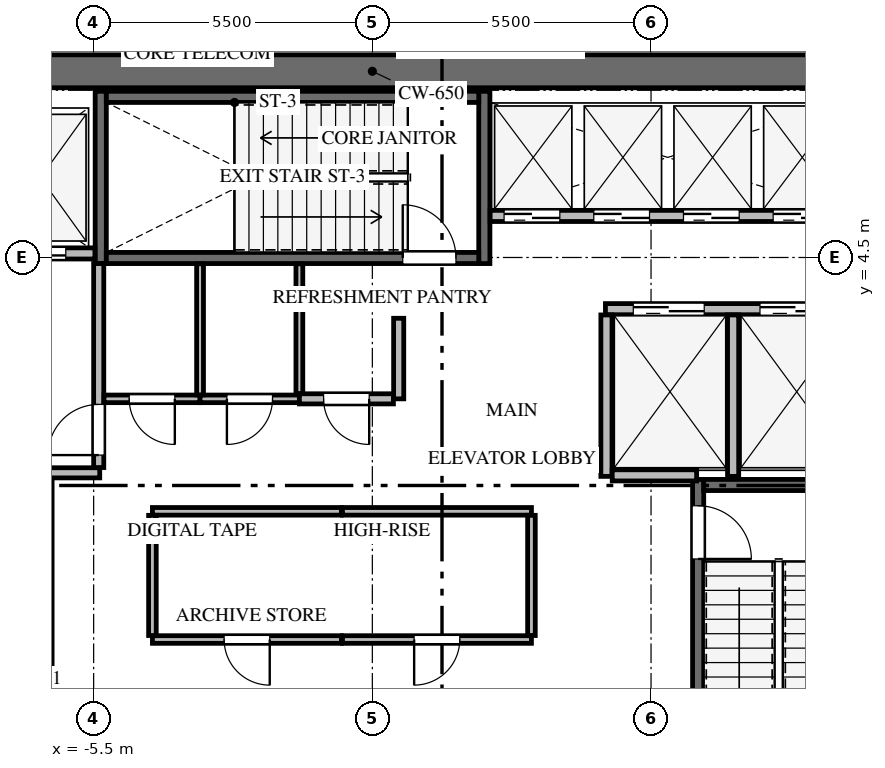
"""IFC4 building model, lengths in metres.
Left out: names, types, materials, properties, quantities, classifications, styles, units other than length and angle.
Written with IfcOpenShell. Run it as: python <this file> out.ifc"""

import sys

from ifc_helpers import new_model, si_unit, direction, frame, frame_2d, origin, place, context, subcontext, project, spatial, rectangle, extrude, source, transform, mapped, element, fill, save


model = new_model("IFC4")
c1 = context("Model", 3, precision=1e-05, world=origin(), true_north=direction((0.0, 1.0)))
c2 = subcontext(c1, "Body", "Model", "MODEL_VIEW")
j1 = project(units=[si_unit("LENGTHUNIT", "METRE"), si_unit("PLANEANGLEUNIT", "RADIAN")], contexts=[c1])
p1 = place(None, origin())
s1 = spatial("IfcSite", under=j1, at=p1, CompositionType="ELEMENT")
p2 = place(p1, origin())
s2 = spatial("IfcBuilding", under=s1, at=p2, CompositionType="ELEMENT")
p3 = place(p2, frame((0.0, 0.0, 162.6)))
s3 = spatial("IfcBuildingStorey", under=s2, at=p3, CompositionType="ELEMENT", Elevation=162.6)
p4 = place(p3, frame((-9.85, 8.175, 0.0), z_axis=(0.0, 0.0, 1.0), x_axis=(1.0, 0.0, 0.0)))
e1 = element("IfcWall", 1, at=p4, inside=s3, PredefinedType="SHEAR", context=c2, shape_type="SweptSolid", body=[
    extrude(rectangle(XDim=19.7, YDim=0.65, at=frame_2d((9.85, 0.0))), origin(), (0.0, 0.0, 1.0), 4.6),
])
p5 = place(p3, frame((-6.43, -7.77, -0.32), z_axis=(0.0, 0.0, 1.0), x_axis=(0.0, 1.0, 0.0)))
e2 = element("IfcWall", 2, at=p5, inside=s3, PredefinedType="SHEAR", context=c2, shape_type="SweptSolid", body=[
    extrude(rectangle(XDim=7.89, YDim=0.22, at=frame_2d((3.945, 0.0))), origin(), (0.0, 0.0, 1.0), 4.68),
])
p6 = place(p5, frame((6.32, 0.0, 0.0)))
e3 = element("IfcOpeningElement", 3, at=p6, cuts=e2, PredefinedType="OPENING", context=c2, shape_type="SweptSolid", body=[
    extrude(rectangle(XDim=1.05, YDim=2.15, at=frame_2d((0.525, 1.075))), frame((0.0, 0.12, 0.0), z_axis=(0.0, -1.0, 0.0), x_axis=(1.0, 0.0, 0.0)), (0.0, 0.0, 1.0), 0.24),
])
p7 = place(p3, frame((6.43, 0.12, -0.32), z_axis=(0.0, 0.0, 1.0), x_axis=(0.0, -1.0, 0.0)))
e4 = element("IfcWall", 4, at=p7, inside=s3, PredefinedType="SHEAR", context=c2, shape_type="SweptSolid", body=[
    extrude(rectangle(XDim=7.89, YDim=0.22, at=frame_2d((3.945, 0.0))), origin(), (0.0, 0.0, 1.0), 4.68),
])
p8 = place(p7, frame((0.52, 0.0, 0.0)))
e5 = element("IfcOpeningElement", 5, at=p8, cuts=e4, PredefinedType="OPENING", context=c2, shape_type="SweptSolid", body=[
    extrude(rectangle(XDim=1.05, YDim=2.15, at=frame_2d((0.525, 1.075))), frame((0.0, 0.12, 0.0), z_axis=(0.0, -1.0, 0.0), x_axis=(1.0, 0.0, 0.0)), (0.0, 0.0, 1.0), 0.24),
])
p9 = place(p3, frame((9.5, 0.01, -0.32), z_axis=(0.0, 0.0, 1.0), x_axis=(-1.0, 0.0, 0.0)))
e6 = element("IfcWall", 6, at=p9, inside=s3, PredefinedType="SHEAR", context=c2, shape_type="SweptSolid", body=[
    extrude(rectangle(XDim=2.96, YDim=0.22, at=frame_2d((1.48, 0.0))), origin(), (0.0, 0.0, 1.0), 4.68),
])
for number, where, z_axis, x_axis in (
    (7, (2.21, 4.38, -0.32), (0.0, 0.0, 1.0), (0.0, 1.0, 0.0)),
    (8, (-5.36, 7.78, -0.32), (0.0, 0.0, 1.0), (0.0, -1.0, 0.0)),
):
    element("IfcWall", number, at=place(p3, frame(where, z_axis=z_axis, x_axis=x_axis)), inside=s3, PredefinedType="SHEAR", context=c2, shape_type="SweptSolid", body=[
        extrude(rectangle(XDim=3.4, YDim=0.22, at=frame_2d((1.7, 0.0))), origin(), (0.0, 0.0, 1.0), 4.68),
    ])
p10 = place(p3, frame((-5.25, 4.49, -0.32), z_axis=(0.0, 0.0, 1.0), x_axis=(1.0, 0.0, 0.0)))
e9 = element("IfcWall", 9, at=p10, inside=s3, PredefinedType="SHEAR", context=c2, shape_type="SweptSolid", body=[
    extrude(rectangle(XDim=7.35, YDim=0.22, at=frame_2d((3.675, 0.0))), origin(), (0.0, 0.0, 1.0), 4.68),
])
p11 = place(p10, frame((5.85, 0.0, 0.0)))
e10 = element("IfcOpeningElement", 10, at=p11, cuts=e9, PredefinedType="OPENING", context=c2, shape_type="SweptSolid", body=[
    extrude(rectangle(XDim=1.05, YDim=2.15, at=frame_2d((0.525, 1.075))), frame((0.0, 0.12, 0.0), z_axis=(0.0, -1.0, 0.0), x_axis=(1.0, 0.0, 0.0)), (0.0, 0.0, 1.0), 0.24),
])
p12 = place(p3, frame((2.1, 7.67, -0.32), z_axis=(0.0, 0.0, 1.0), x_axis=(-1.0, 0.0, 0.0)))
e11 = element("IfcWall", 11, at=p12, inside=s3, PredefinedType="SHEAR", context=c2, shape_type="SweptSolid", body=[
    extrude(rectangle(XDim=7.35, YDim=0.22, at=frame_2d((3.675, 0.0))), origin(), (0.0, 0.0, 1.0), 4.68),
])
p13 = place(p3, frame((-9.65, 4.58, 0.0), z_axis=(0.0, 0.0, 1.0), x_axis=(1.0, 0.0, 0.0)))
e12 = element("IfcWall", 12, at=p13, inside=s3, PredefinedType="SOLIDWALL", context=c2, shape_type="SweptSolid", body=[
    extrude(rectangle(XDim=4.175, YDim=0.22, at=frame_2d((2.087, 0.0))), origin(), (0.0, 0.0, 1.0), 4.345),
])
p14 = place(p13, frame((0.4, 0.0, 0.0)))
e13 = element("IfcOpeningElement", 13, at=p14, cuts=e12, PredefinedType="OPENING", context=c2, shape_type="SweptSolid", body=[
    extrude(rectangle(XDim=1.2, YDim=2.15, at=frame_2d((0.6, 1.075))), frame((0.0, 0.12, 0.0), z_axis=(0.0, -1.0, 0.0), x_axis=(1.0, 0.0, 0.0)), (0.0, 0.0, 1.0), 0.24),
])
p15 = place(p13, frame((2.4, 0.0, 0.0)))
e14 = element("IfcOpeningElement", 14, at=p15, cuts=e12, PredefinedType="OPENING", context=c2, shape_type="SweptSolid", body=[
    extrude(rectangle(XDim=1.2, YDim=2.15, at=frame_2d((0.6, 1.075))), frame((0.0, 0.12, 0.0), z_axis=(0.0, -1.0, 0.0), x_axis=(1.0, 0.0, 0.0)), (0.0, 0.0, 1.0), 0.24),
])
p16 = place(p3, frame((-9.65, 0.25, 0.0), z_axis=(0.0, 0.0, 1.0), x_axis=(1.0, 0.0, 0.0)))
e15 = element("IfcWall", 15, at=p16, inside=s3, PredefinedType="SOLIDWALL", context=c2, shape_type="SweptSolid", body=[
    extrude(rectangle(XDim=4.27, YDim=0.2, at=frame_2d((2.135, 0.0))), origin(), (0.0, 0.0, 1.0), 4.345),
])
p17 = place(p3, frame((-5.4, 0.354, 0.0), z_axis=(0.0, 0.0, 1.0), x_axis=(0.0, 1.0, 0.0)))
e16 = element("IfcWall", 16, at=p17, inside=s3, PredefinedType="SOLIDWALL", context=c2, shape_type="SweptSolid", body=[
    extrude(rectangle(XDim=4.026, YDim=0.2, at=frame_2d((2.013, 0.0))), origin(), (0.0, 0.0, 1.0), 4.345),
])
p18 = place(p17, frame((0.246, 0.0, 0.0)))
e17 = element("IfcOpeningElement", 17, at=p18, cuts=e16, PredefinedType="OPENING", context=c2, shape_type="SweptSolid", body=[
    extrude(rectangle(XDim=1.0, YDim=2.15, at=frame_2d((0.5, 1.075))), frame((0.0, 0.11, 0.0), z_axis=(0.0, -1.0, 0.0), x_axis=(1.0, 0.0, 0.0)), (0.0, 0.0, 1.0), 0.22),
])
p19 = place(p3, frame((4.6, 3.48, 0.0), z_axis=(0.0, 0.0, 1.0), x_axis=(1.0, 0.0, 0.0)))
e18 = element("IfcWall", 18, at=p19, inside=s3, PredefinedType="SOLIDWALL", context=c2, shape_type="SweptSolid", body=[
    extrude(rectangle(XDim=5.05, YDim=0.22, at=frame_2d((2.525, 0.0))), origin(), (0.0, 0.0, 1.0), 4.345),
])
p20 = place(p19, frame((0.55, 0.0, 0.0)))
e19 = element("IfcOpeningElement", 19, at=p20, cuts=e18, PredefinedType="OPENING", context=c2, shape_type="SweptSolid", body=[
    extrude(rectangle(XDim=1.4, YDim=2.15, at=frame_2d((0.7, 1.075))), frame((0.0, 0.12, 0.0), z_axis=(0.0, -1.0, 0.0), x_axis=(1.0, 0.0, 0.0)), (0.0, 0.0, 1.0), 0.24),
])
p21 = place(p19, frame((3.05, 0.0, 0.0)))
e20 = element("IfcOpeningElement", 20, at=p21, cuts=e18, PredefinedType="OPENING", context=c2, shape_type="SweptSolid", body=[
    extrude(rectangle(XDim=1.4, YDim=2.15, at=frame_2d((0.7, 1.075))), frame((0.0, 0.12, 0.0), z_axis=(0.0, -1.0, 0.0), x_axis=(1.0, 0.0, 0.0)), (0.0, 0.0, 1.0), 0.24),
])
for number, where, z_axis, x_axis in (
    (21, (4.62, 0.18, 0.0), (0.0, 0.0, 1.0), (0.0, 1.0, 0.0)),
    (22, (7.12, 0.18, 0.0), (0.0, 0.0, 1.0), (0.0, 1.0, 0.0)),
):
    element("IfcWall", number, at=place(p3, frame(where, z_axis=z_axis, x_axis=x_axis)), inside=s3, PredefinedType="SOLIDWALL", context=c2, shape_type="SweptSolid", body=[
        extrude(rectangle(XDim=3.186, YDim=0.22, at=frame_2d((1.593, 0.0))), origin(), (0.0, 0.0, 1.0), 4.345),
    ])
p22 = place(p3, frame((4.734, 0.2, 0.0), z_axis=(0.0, 0.0, 1.0), x_axis=(1.0, 0.0, 0.0)))
e23 = element("IfcWall", 23, at=p22, inside=s3, PredefinedType="SOLIDWALL", context=c2, shape_type="SweptSolid", body=[
    extrude(rectangle(XDim=1.666, YDim=0.22, at=frame_2d((0.833, 0.0))), origin(), (0.0, 0.0, 1.0), 4.345),
])
p23 = place(p3, frame((2.325, 5.32, 0.0), z_axis=(0.0, 0.0, 1.0), x_axis=(1.0, 0.0, 0.0)))
e24 = element("IfcWall", 24, at=p23, inside=s3, PredefinedType="SOLIDWALL", context=c2, shape_type="SweptSolid", body=[
    extrude(rectangle(XDim=7.325, YDim=0.22, at=frame_2d((3.663, 0.0))), origin(), (0.0, 0.0, 1.0), 4.345),
])
p24 = place(p23, frame((0.275, 0.0, 0.0)))
e25 = element("IfcOpeningElement", 25, at=p24, cuts=e24, PredefinedType="OPENING", context=c2, shape_type="SweptSolid", body=[
    extrude(rectangle(XDim=1.1, YDim=2.15, at=frame_2d((0.55, 1.075))), frame((0.0, 0.12, 0.0), z_axis=(0.0, -1.0, 0.0), x_axis=(1.0, 0.0, 0.0)), (0.0, 0.0, 1.0), 0.24),
])
p25 = place(p23, frame((2.045, 0.0, 0.0)))
e26 = element("IfcOpeningElement", 26, at=p25, cuts=e24, PredefinedType="OPENING", context=c2, shape_type="SweptSolid", body=[
    extrude(rectangle(XDim=1.1, YDim=2.15, at=frame_2d((0.55, 1.075))), frame((0.0, 0.12, 0.0), z_axis=(0.0, -1.0, 0.0), x_axis=(1.0, 0.0, 0.0)), (0.0, 0.0, 1.0), 0.24),
])
p26 = place(p23, frame((3.815, 0.0, 0.0)))
e27 = element("IfcOpeningElement", 27, at=p26, cuts=e24, PredefinedType="OPENING", context=c2, shape_type="SweptSolid", body=[
    extrude(rectangle(XDim=1.1, YDim=2.15, at=frame_2d((0.55, 1.075))), frame((0.0, 0.12, 0.0), z_axis=(0.0, -1.0, 0.0), x_axis=(1.0, 0.0, 0.0)), (0.0, 0.0, 1.0), 0.24),
])
p27 = place(p23, frame((5.585, 0.0, 0.0)))
e28 = element("IfcOpeningElement", 28, at=p27, cuts=e24, PredefinedType="OPENING", context=c2, shape_type="SweptSolid", body=[
    extrude(rectangle(XDim=1.1, YDim=2.15, at=frame_2d((0.55, 1.075))), frame((0.0, 0.12, 0.0), z_axis=(0.0, -1.0, 0.0), x_axis=(1.0, 0.0, 0.0)), (0.0, 0.0, 1.0), 0.24),
])
p28 = place(p3, frame((-0.61, -3.04, 0.0), z_axis=(0.0, 0.0, 1.0), x_axis=(-1.0, 0.0, 0.0)))
e29 = element("IfcWall", 29, at=p28, inside=s3, PredefinedType="PARTITIONING", context=c2, shape_type="SweptSolid", body=[
    extrude(rectangle(XDim=3.73, YDim=0.15, at=frame_2d((1.865, 0.0))), origin(), (0.0, 0.0, 1.0), 4.345),
])
p29 = place(p28, frame((1.415, 0.0, 0.0)))
e30 = element("IfcOpeningElement", 30, at=p29, cuts=e29, PredefinedType="OPENING", context=c2, shape_type="SweptSolid", body=[
    extrude(rectangle(XDim=0.9, YDim=2.05, at=frame_2d((0.45, 1.025))), frame((0.0, 0.085, 0.0), z_axis=(0.0, -1.0, 0.0), x_axis=(1.0, 0.0, 0.0)), (0.0, 0.0, 1.0), 0.17),
])
p30 = place(p3, frame((-4.34, -0.51, 0.0), z_axis=(0.0, 0.0, 1.0), x_axis=(1.0, 0.0, 0.0)))
e31 = element("IfcWall", 31, at=p30, inside=s3, PredefinedType="PARTITIONING", context=c2, shape_type="SweptSolid", body=[
    extrude(rectangle(XDim=3.73, YDim=0.15, at=frame_2d((1.865, 0.0))), origin(), (0.0, 0.0, 1.0), 4.345),
])
p31 = place(p3, frame((-4.34, -2.961, 0.0), z_axis=(0.0, 0.0, 1.0), x_axis=(0.0, 1.0, 0.0)))
e32 = element("IfcWall", 32, at=p31, inside=s3, PredefinedType="PARTITIONING", context=c2, shape_type="SweptSolid", body=[
    extrude(rectangle(XDim=2.372, YDim=0.15, at=frame_2d((1.186, 0.0))), origin(), (0.0, 0.0, 1.0), 4.345),
])
p32 = place(p3, frame((3.14, -3.04, 0.0), z_axis=(0.0, 0.0, 1.0), x_axis=(-1.0, 0.0, 0.0)))
e33 = element("IfcWall", 33, at=p32, inside=s3, PredefinedType="PARTITIONING", context=c2, shape_type="SweptSolid", body=[
    extrude(rectangle(XDim=3.73, YDim=0.15, at=frame_2d((1.865, 0.0))), origin(), (0.0, 0.0, 1.0), 4.345),
])
p33 = place(p32, frame((1.415, 0.0, 0.0)))
e34 = element("IfcOpeningElement", 34, at=p33, cuts=e33, PredefinedType="OPENING", context=c2, shape_type="SweptSolid", body=[
    extrude(rectangle(XDim=0.9, YDim=2.05, at=frame_2d((0.45, 1.025))), frame((0.0, 0.085, 0.0), z_axis=(0.0, -1.0, 0.0), x_axis=(1.0, 0.0, 0.0)), (0.0, 0.0, 1.0), 0.17),
])
p34 = place(p3, frame((-0.59, -0.51, 0.0), z_axis=(0.0, 0.0, 1.0), x_axis=(1.0, 0.0, 0.0)))
e35 = element("IfcWall", 35, at=p34, inside=s3, PredefinedType="PARTITIONING", context=c2, shape_type="SweptSolid", body=[
    extrude(rectangle(XDim=3.73, YDim=0.15, at=frame_2d((1.865, 0.0))), origin(), (0.0, 0.0, 1.0), 4.345),
])
p35 = place(p3, frame((3.14, -0.589, 0.0), z_axis=(0.0, 0.0, 1.0), x_axis=(0.0, -1.0, 0.0)))
e36 = element("IfcWall", 36, at=p35, inside=s3, PredefinedType="PARTITIONING", context=c2, shape_type="SweptSolid", body=[
    extrude(rectangle(XDim=2.372, YDim=0.15, at=frame_2d((1.186, 0.0))), origin(), (0.0, 0.0, 1.0), 4.345),
])
p36 = place(p3, frame((-3.4, 1.71, 0.0), z_axis=(0.0, 0.0, 1.0), x_axis=(-1.0, 0.0, 0.0)))
e37 = element("IfcWall", 37, at=p36, inside=s3, PredefinedType="PARTITIONING", context=c2, shape_type="SweptSolid", body=[
    extrude(rectangle(XDim=1.896, YDim=0.15, at=frame_2d((0.948, 0.0))), origin(), (0.0, 0.0, 1.0), 4.345),
])
p37 = place(p36, frame((0.498, 0.0, 0.0)))
e38 = element("IfcOpeningElement", 38, at=p37, cuts=e37, PredefinedType="OPENING", context=c2, shape_type="SweptSolid", body=[
    extrude(rectangle(XDim=0.9, YDim=2.05, at=frame_2d((0.45, 1.025))), frame((0.0, 0.085, 0.0), z_axis=(0.0, -1.0, 0.0), x_axis=(1.0, 0.0, 0.0)), (0.0, 0.0, 1.0), 0.17),
])
p38 = place(p3, frame((-1.44, 1.71, 0.0), z_axis=(0.0, 0.0, 1.0), x_axis=(-1.0, 0.0, 0.0)))
e39 = element("IfcWall", 39, at=p38, inside=s3, PredefinedType="PARTITIONING", context=c2, shape_type="SweptSolid", body=[
    extrude(rectangle(XDim=1.96, YDim=0.15, at=frame_2d((0.98, 0.0))), origin(), (0.0, 0.0, 1.0), 4.345),
])
p39 = place(p38, frame((0.53, 0.0, 0.0)))
e40 = element("IfcOpeningElement", 40, at=p39, cuts=e39, PredefinedType="OPENING", context=c2, shape_type="SweptSolid", body=[
    extrude(rectangle(XDim=0.9, YDim=2.05, at=frame_2d((0.45, 1.025))), frame((0.0, 0.085, 0.0), z_axis=(0.0, -1.0, 0.0), x_axis=(1.0, 0.0, 0.0)), (0.0, 0.0, 1.0), 0.17),
])
p40 = place(p3, frame((0.52, 3.3, 0.0), z_axis=(0.0, 0.0, 1.0), x_axis=(0.0, -1.0, 0.0)))
e41 = element("IfcWall", 41, at=p40, inside=s3, PredefinedType="SOLIDWALL", context=c2, shape_type="SweptSolid", body=[
    extrude(rectangle(XDim=1.59, YDim=0.2, at=frame_2d((0.795, 0.0))), origin(), (0.0, 0.0, 1.0), 4.345),
])
p41 = place(p3, frame((0.416, 1.71, 0.0), z_axis=(0.0, 0.0, 1.0), x_axis=(-1.0, 0.0, 0.0)))
e42 = element("IfcWall", 42, at=p41, inside=s3, PredefinedType="SOLIDWALL", context=c2, shape_type="SweptSolid", body=[
    extrude(rectangle(XDim=1.856, YDim=0.2, at=frame_2d((0.928, 0.0))), origin(), (0.0, 0.0, 1.0), 4.345),
])
p42 = place(p41, frame((0.478, 0.0, 0.0)))
e43 = element("IfcOpeningElement", 43, at=p42, cuts=e42, PredefinedType="OPENING", context=c2, shape_type="SweptSolid", body=[
    extrude(rectangle(XDim=0.9, YDim=2.05, at=frame_2d((0.45, 1.025))), frame((0.0, 0.11, 0.0), z_axis=(0.0, -1.0, 0.0), x_axis=(1.0, 0.0, 0.0)), (0.0, 0.0, 1.0), 0.22),
])
p43 = place(p3, frame((-3.4, 4.375, 0.0), z_axis=(0.0, 0.0, 1.0), x_axis=(0.0, -1.0, 0.0)))
e44 = element("IfcWall", 44, at=p43, inside=s3, PredefinedType="PARTITIONING", context=c2, shape_type="SweptSolid", body=[
    extrude(rectangle(XDim=2.586, YDim=0.135, at=frame_2d((1.293, 0.0))), origin(), (0.0, 0.0, 1.0), 4.345),
])
p44 = place(p3, frame((-1.44, 4.375, 0.0), z_axis=(0.0, 0.0, 1.0), x_axis=(0.0, -1.0, 0.0)))
e45 = element("IfcWall", 45, at=p44, inside=s3, PredefinedType="PARTITIONING", context=c2, shape_type="SweptSolid", body=[
    extrude(rectangle(XDim=2.561, YDim=0.135, at=frame_2d((1.281, 0.0))), origin(), (0.0, 0.0, 1.0), 4.345),
])
m1 = source(origin(), c2, "Body", "SweptSolid", [
    extrude(rectangle(XDim=1.05, YDim=2.15, at=frame_2d((0.525, 1.075))), frame((0.0, 0.025, 0.0), z_axis=(0.0, -1.0, 0.0), x_axis=(1.0, 0.0, 0.0)), (0.0, 0.0, 1.0), 0.05),
])
p45 = place(p8, origin())
e46 = element("IfcDoor", 46, at=p45, inside=s3, OperationType="SINGLE_SWING_RIGHT", PredefinedType="DOOR", context=c2, shape_type="MappedRepresentation", body=[
    mapped(m1, transform((0.0, 0.0, 0.0), x_axis=(1.0, 0.0, 0.0), y_axis=(0.0, 1.0, 0.0), z_axis=(0.0, 0.0, 1.0), scale=1.0)),
])
fill(e5, e46)
m2 = source(origin(), c2, "Body", "SweptSolid", [
    extrude(rectangle(XDim=1.05, YDim=2.15, at=frame_2d((0.525, 1.075))), frame((0.0, 0.025, 0.0), z_axis=(0.0, -1.0, 0.0), x_axis=(1.0, 0.0, 0.0)), (0.0, 0.0, 1.0), 0.05),
])
p46 = place(p11, origin())
e47 = element("IfcDoor", 47, at=p46, inside=s3, OperationType="SINGLE_SWING_LEFT", PredefinedType="DOOR", context=c2, shape_type="MappedRepresentation", body=[
    mapped(m2, transform((0.0, 0.0, 0.0), x_axis=(1.0, 0.0, 0.0), y_axis=(0.0, 1.0, 0.0), z_axis=(0.0, 0.0, 1.0), scale=1.0)),
])
fill(e10, e47)
m3 = source(origin(), c2, "Body", "SweptSolid", [
    extrude(rectangle(XDim=1.2, YDim=2.15, at=frame_2d((0.6, 1.075))), frame((0.0, 0.025, 0.0), z_axis=(0.0, -1.0, 0.0), x_axis=(1.0, 0.0, 0.0)), (0.0, 0.0, 1.0), 0.05),
])
p47 = place(p15, origin())
e48 = element("IfcDoor", 48, at=p47, inside=s3, OperationType="DOUBLE_DOOR_SLIDING", PredefinedType="DOOR", context=c2, shape_type="MappedRepresentation", body=[
    mapped(m3, transform((0.0, 0.0, 0.0), x_axis=(1.0, 0.0, 0.0), y_axis=(0.0, 1.0, 0.0), z_axis=(0.0, 0.0, 1.0), scale=1.0)),
])
fill(e14, e48)
m4 = source(origin(), c2, "Body", "SweptSolid", [
    extrude(rectangle(XDim=1.0, YDim=2.15, at=frame_2d((0.5, 1.075))), frame((0.0, 0.025, 0.0), z_axis=(0.0, -1.0, 0.0), x_axis=(1.0, 0.0, 0.0)), (0.0, 0.0, 1.0), 0.05),
])
p48 = place(p18, origin())
e49 = element("IfcDoor", 49, at=p48, inside=s3, OperationType="SINGLE_SWING_LEFT", PredefinedType="DOOR", context=c2, shape_type="MappedRepresentation", body=[
    mapped(m4, transform((0.0, 0.0, 0.0), x_axis=(1.0, 0.0, 0.0), y_axis=(0.0, 1.0, 0.0), z_axis=(0.0, 0.0, 1.0), scale=1.0)),
])
fill(e17, e49)
m5 = source(origin(), c2, "Body", "SweptSolid", [
    extrude(rectangle(XDim=1.4, YDim=2.15, at=frame_2d((0.7, 1.075))), frame((0.0, 0.025, 0.0), z_axis=(0.0, -1.0, 0.0), x_axis=(1.0, 0.0, 0.0)), (0.0, 0.0, 1.0), 0.05),
])
p49 = place(p20, origin())
e50 = element("IfcDoor", 50, at=p49, inside=s3, OperationType="DOUBLE_DOOR_SLIDING", PredefinedType="DOOR", context=c2, shape_type="MappedRepresentation", body=[
    mapped(m5, transform((0.0, 0.0, 0.0), x_axis=(1.0, 0.0, 0.0), y_axis=(0.0, 1.0, 0.0), z_axis=(0.0, 0.0, 1.0), scale=1.0)),
])
fill(e19, e50)
p50 = place(p21, origin())
e51 = element("IfcDoor", 51, at=p50, inside=s3, OperationType="DOUBLE_DOOR_SLIDING", PredefinedType="DOOR", context=c2, shape_type="MappedRepresentation", body=[
    mapped(m5, transform((0.0, 0.0, 0.0), x_axis=(1.0, 0.0, 0.0), y_axis=(0.0, 1.0, 0.0), z_axis=(0.0, 0.0, 1.0), scale=1.0)),
])
fill(e20, e51)
m6 = source(origin(), c2, "Body", "SweptSolid", [
    extrude(rectangle(XDim=1.1, YDim=2.15, at=frame_2d((0.55, 1.075))), frame((0.0, 0.025, 0.0), z_axis=(0.0, -1.0, 0.0), x_axis=(1.0, 0.0, 0.0)), (0.0, 0.0, 1.0), 0.05),
])
p51 = place(p24, origin())
e52 = element("IfcDoor", 52, at=p51, inside=s3, OperationType="DOUBLE_DOOR_SLIDING", PredefinedType="DOOR", context=c2, shape_type="MappedRepresentation", body=[
    mapped(m6, transform((0.0, 0.0, 0.0), x_axis=(1.0, 0.0, 0.0), y_axis=(0.0, 1.0, 0.0), z_axis=(0.0, 0.0, 1.0), scale=1.0)),
])
fill(e25, e52)
p52 = place(p25, origin())
e53 = element("IfcDoor", 53, at=p52, inside=s3, OperationType="DOUBLE_DOOR_SLIDING", PredefinedType="DOOR", context=c2, shape_type="MappedRepresentation", body=[
    mapped(m6, transform((0.0, 0.0, 0.0), x_axis=(1.0, 0.0, 0.0), y_axis=(0.0, 1.0, 0.0), z_axis=(0.0, 0.0, 1.0), scale=1.0)),
])
fill(e26, e53)
p53 = place(p26, origin())
e54 = element("IfcDoor", 54, at=p53, inside=s3, OperationType="DOUBLE_DOOR_SLIDING", PredefinedType="DOOR", context=c2, shape_type="MappedRepresentation", body=[
    mapped(m6, transform((0.0, 0.0, 0.0), x_axis=(1.0, 0.0, 0.0), y_axis=(0.0, 1.0, 0.0), z_axis=(0.0, 0.0, 1.0), scale=1.0)),
])
fill(e27, e54)
p54 = place(p27, origin())
e55 = element("IfcDoor", 55, at=p54, inside=s3, OperationType="DOUBLE_DOOR_SLIDING", PredefinedType="DOOR", context=c2, shape_type="MappedRepresentation", body=[
    mapped(m6, transform((0.0, 0.0, 0.0), x_axis=(1.0, 0.0, 0.0), y_axis=(0.0, 1.0, 0.0), z_axis=(0.0, 0.0, 1.0), scale=1.0)),
])
fill(e28, e55)
m7 = source(origin(), c2, "Body", "SweptSolid", [
    extrude(rectangle(XDim=0.9, YDim=2.05, at=frame_2d((0.45, 1.025))), frame((0.0, 0.025, 0.0), z_axis=(0.0, -1.0, 0.0), x_axis=(1.0, 0.0, 0.0)), (0.0, 0.0, 1.0), 0.05),
])
p55 = place(p29, origin())
e56 = element("IfcDoor", 56, at=p55, inside=s3, OperationType="SINGLE_SWING_LEFT", PredefinedType="DOOR", context=c2, shape_type="MappedRepresentation", body=[
    mapped(m7, transform((0.0, 0.0, 0.0), x_axis=(1.0, 0.0, 0.0), y_axis=(0.0, 1.0, 0.0), z_axis=(0.0, 0.0, 1.0), scale=1.0)),
])
fill(e30, e56)
m8 = source(origin(), c2, "Body", "SweptSolid", [
    extrude(rectangle(XDim=0.9, YDim=2.05, at=frame_2d((0.45, 1.025))), frame((0.0, 0.025, 0.0), z_axis=(0.0, -1.0, 0.0), x_axis=(1.0, 0.0, 0.0)), (0.0, 0.0, 1.0), 0.05),
])
p56 = place(p33, origin())
e57 = element("IfcDoor", 57, at=p56, inside=s3, OperationType="SINGLE_SWING_RIGHT", PredefinedType="DOOR", context=c2, shape_type="MappedRepresentation", body=[
    mapped(m8, transform((0.0, 0.0, 0.0), x_axis=(1.0, 0.0, 0.0), y_axis=(0.0, 1.0, 0.0), z_axis=(0.0, 0.0, 1.0), scale=1.0)),
])
fill(e34, e57)
p57 = place(p37, origin())
e58 = element("IfcDoor", 58, at=p57, inside=s3, OperationType="SINGLE_SWING_LEFT", PredefinedType="DOOR", context=c2, shape_type="MappedRepresentation", body=[
    mapped(m7, transform((0.0, 0.0, 0.0), x_axis=(1.0, 0.0, 0.0), y_axis=(0.0, 1.0, 0.0), z_axis=(0.0, 0.0, 1.0), scale=1.0)),
])
fill(e38, e58)
p58 = place(p39, origin())
e59 = element("IfcDoor", 59, at=p58, inside=s3, OperationType="SINGLE_SWING_RIGHT", PredefinedType="DOOR", context=c2, shape_type="MappedRepresentation", body=[
    mapped(m8, transform((0.0, 0.0, 0.0), x_axis=(1.0, 0.0, 0.0), y_axis=(0.0, 1.0, 0.0), z_axis=(0.0, 0.0, 1.0), scale=1.0)),
])
fill(e40, e59)
p59 = place(p42, origin())
e60 = element("IfcDoor", 60, at=p59, inside=s3, OperationType="SINGLE_SWING_LEFT", PredefinedType="DOOR", context=c2, shape_type="MappedRepresentation", body=[
    mapped(m7, transform((0.0, 0.0, 0.0), x_axis=(1.0, 0.0, 0.0), y_axis=(0.0, 1.0, 0.0), z_axis=(0.0, 0.0, 1.0), scale=1.0)),
])
fill(e43, e60)
save(model, sys.argv[1])
